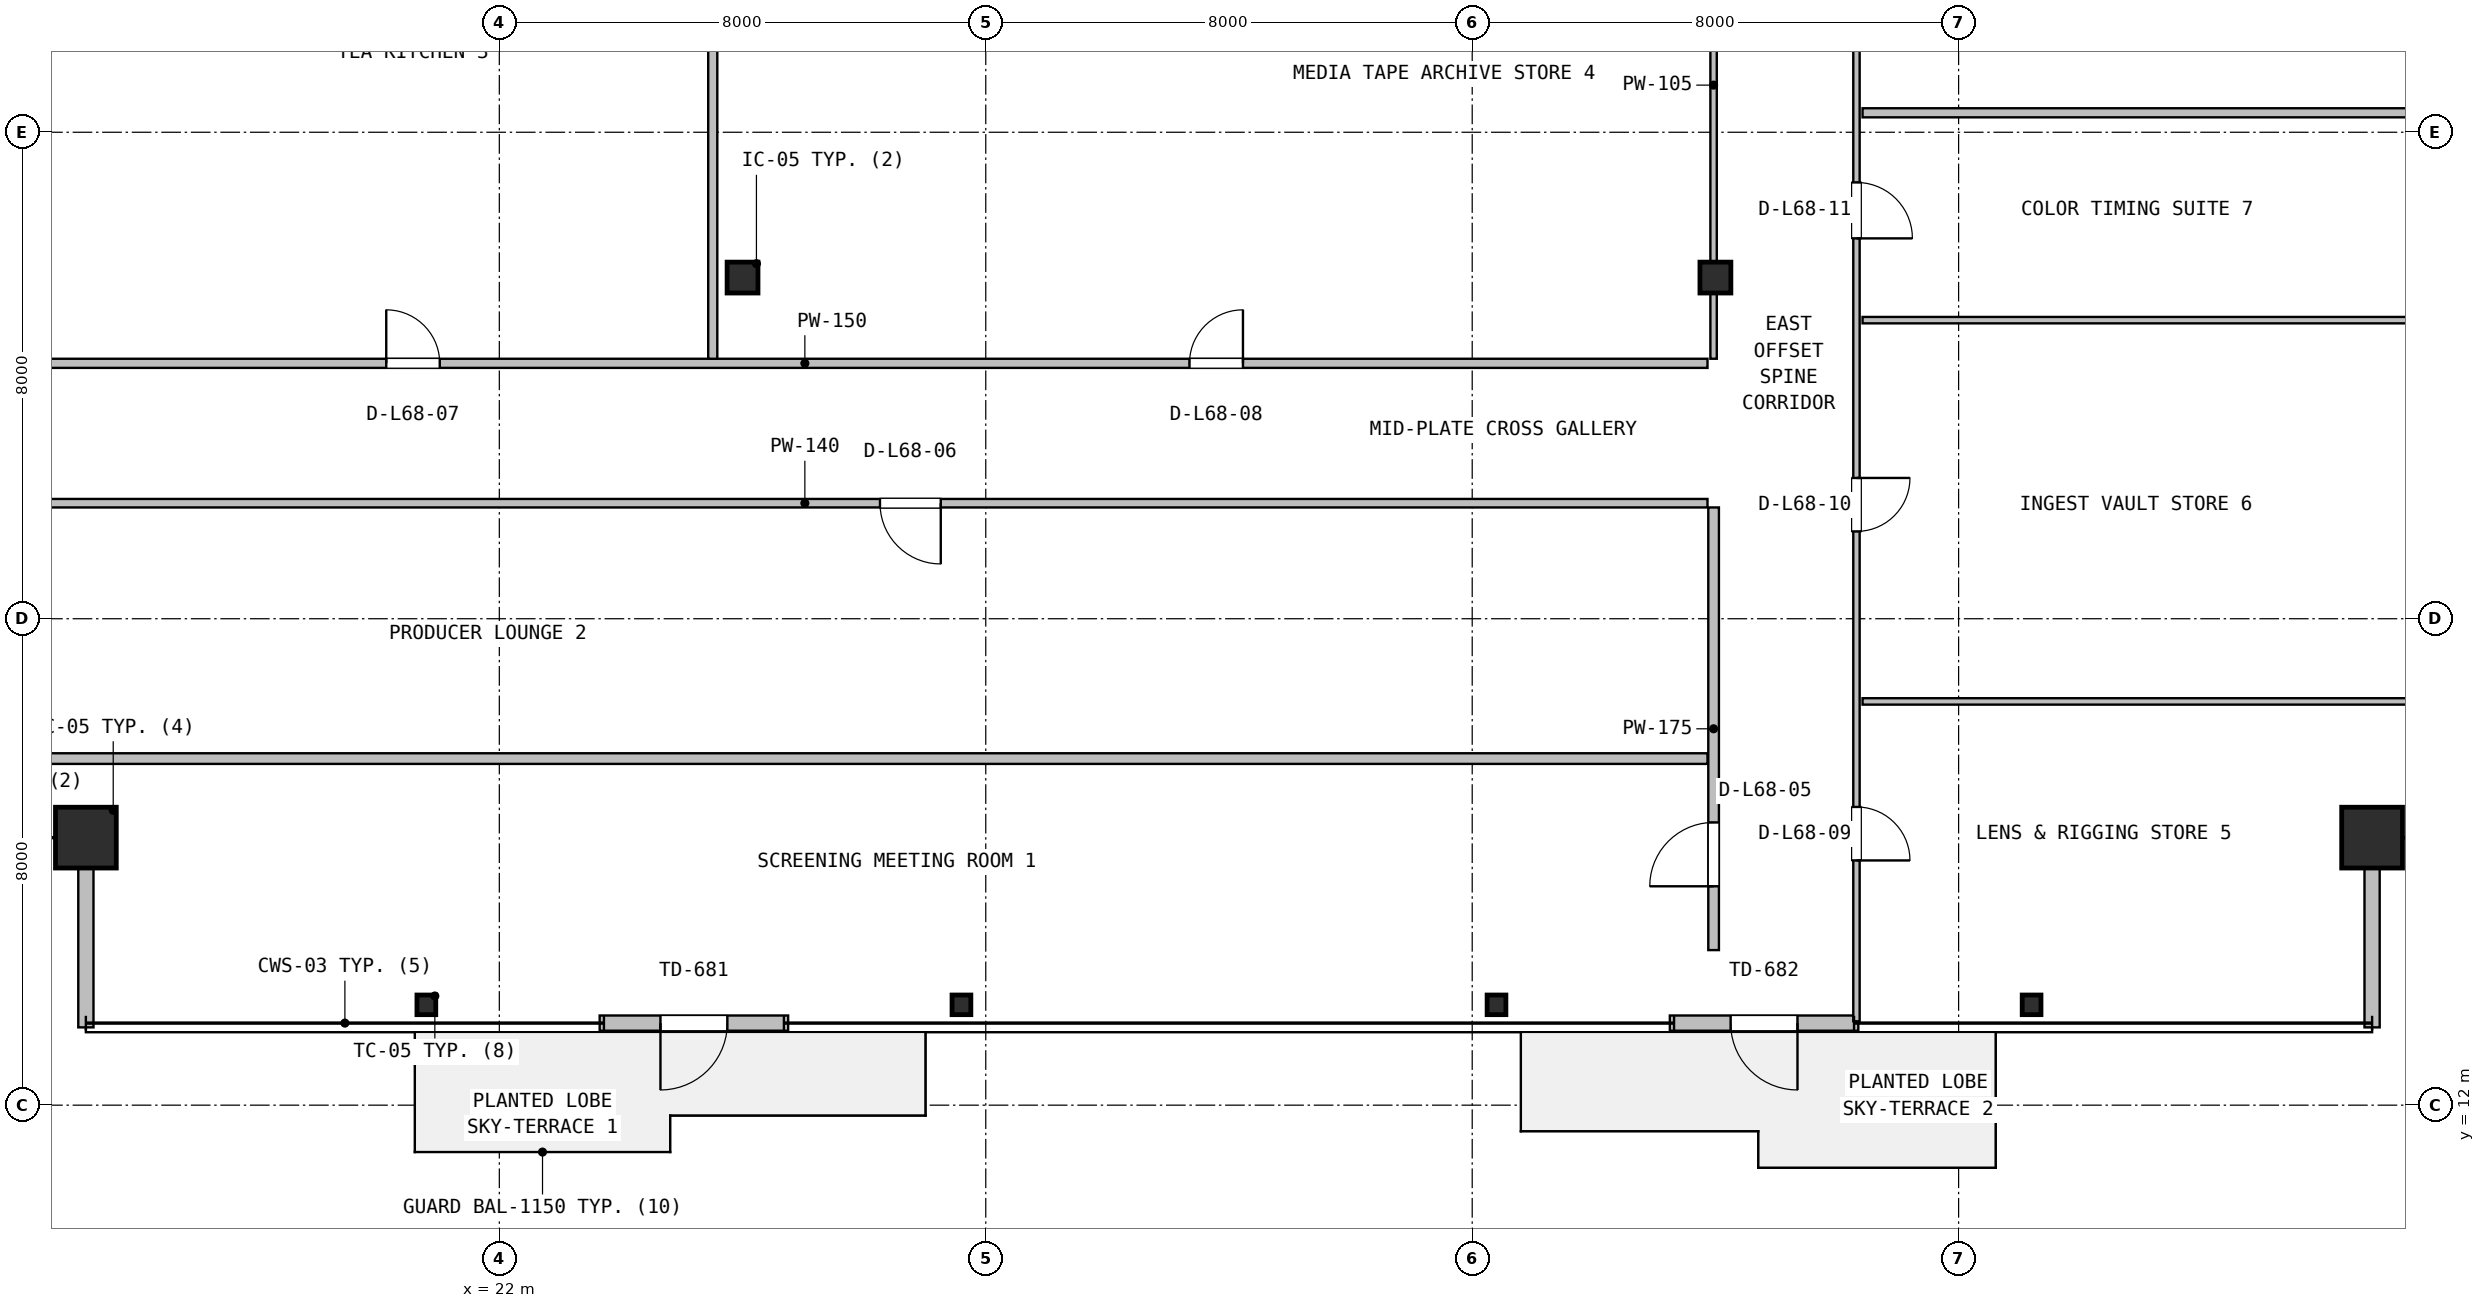
"""IFC4 building model, lengths in metres.
Left out: names, types, materials, properties, quantities, classifications, styles, units other than length and angle.
Written with IfcOpenShell. Run it as: python <this file> out.ifc"""

import sys

from ifc_helpers import new_model, si_unit, direction, frame, frame_2d, origin, origin_2d, place, context, subcontext, project, spatial, rectangle, hollow_rectangle, hollow_circle, i_section, extrude, source, transform, mapped, element, fill, save


model = new_model("IFC4")
c1 = context("Model", 3, precision=1e-05, world=origin(), true_north=direction((0.0, 1.0)))
c2 = subcontext(c1, "Body", "Model", "MODEL_VIEW")
j1 = project(units=[si_unit("LENGTHUNIT", "METRE"), si_unit("PLANEANGLEUNIT", "RADIAN")], contexts=[c1])
p1 = place(None, origin())
s1 = spatial("IfcSite", under=j1, at=p1, CompositionType="ELEMENT")
p2 = place(p1, origin())
s2 = spatial("IfcBuilding", under=s1, at=p2, CompositionType="ELEMENT")
p3 = place(p2, frame((0.0, 0.0, 273.6)))
s3 = spatial("IfcBuildingStorey", under=s2, at=p3, CompositionType="ELEMENT", Elevation=273.6)
m1 = source(origin(), c2, "Body", "SweptSolid", [
    extrude(hollow_rectangle(XDim=1.0, YDim=1.0, WallThickness=0.04, at=origin_2d()), origin(), (0.0, 0.0, 1.0), 3.8),
])
for number, where, z_axis, x_axis in (
    (1, (15.2, 16.4, 0.0), (0.0, 0.0, 1.0), (1.0, 0.0, 0.0)),
    (2, (52.8, 16.4, 0.0), (0.0, 0.0, 1.0), (1.0, 0.0, 0.0)),
):
    element("IfcColumn", number, at=place(p3, frame(where, z_axis=z_axis, x_axis=x_axis)), inside=s3, PredefinedType="COLUMN", context=c2, shape_type="MappedRepresentation", body=[
        mapped(m1, transform((0.0, 0.0, 0.0), x_axis=(1.0, 0.0, 0.0), y_axis=(0.0, 1.0, 0.0), z_axis=(0.0, 0.0, 1.0), scale=1.0)),
    ])
m2 = source(origin(), c2, "Body", "SweptSolid", [
    extrude(i_section(OverallWidth=0.309, OverallDepth=0.323, WebThickness=0.014, FlangeThickness=0.023, FilletRadius=0.015, at=origin_2d()), origin(), (0.0, 0.0, 1.0), 3.8),
])
for number, where, z_axis, x_axis in (
    (3, (20.8, 13.65, 0.0), (0.0, 0.0, 1.0), (1.0, 0.0, 0.0)),
    (4, (29.6, 13.65, 0.0), (0.0, 0.0, 1.0), (1.0, 0.0, 0.0)),
    (5, (38.4, 13.65, 0.0), (0.0, 0.0, 1.0), (1.0, 0.0, 0.0)),
    (6, (47.2, 13.65, 0.0), (0.0, 0.0, 1.0), (1.0, 0.0, 0.0)),
):
    element("IfcColumn", number, at=place(p3, frame(where, z_axis=z_axis, x_axis=x_axis)), inside=s3, PredefinedType="COLUMN", context=c2, shape_type="MappedRepresentation", body=[
        mapped(m2, transform((0.0, 0.0, 0.0), x_axis=(1.0, 0.0, 0.0), y_axis=(0.0, 1.0, 0.0), z_axis=(0.0, 0.0, 1.0), scale=1.0)),
    ])
m3 = source(origin(), c2, "Body", "SweptSolid", [
    extrude(hollow_circle(Radius=0.254, WallThickness=0.02, at=origin_2d()), origin(), (0.0, 0.0, 1.0), 3.8),
])
for number, where, z_axis, x_axis in (
    (7, (26.0, 25.61, 0.0), (0.0, 0.0, 1.0), (1.0, 0.0, 0.0)),
    (8, (42.0, 25.61, 0.0), (0.0, 0.0, 1.0), (1.0, 0.0, 0.0)),
):
    element("IfcColumn", number, at=place(p3, frame(where, z_axis=z_axis, x_axis=x_axis)), inside=s3, PredefinedType="COLUMN", context=c2, shape_type="MappedRepresentation", body=[
        mapped(m3, transform((0.0, 0.0, 0.0), x_axis=(1.0, 0.0, 0.0), y_axis=(0.0, 1.0, 0.0), z_axis=(0.0, 0.0, 1.0), scale=1.0)),
    ])
p4 = place(p3, frame((23.65, 13.35, 0.0), z_axis=(0.0, 0.0, 1.0), x_axis=(1.0, 0.0, 0.0)))
e9 = element("IfcWall", 9, at=p4, inside=s3, PredefinedType="SOLIDWALL", context=c2, shape_type="SweptSolid", body=[
    extrude(rectangle(XDim=3.1, YDim=0.25, at=frame_2d((1.55, 0.0))), origin(), (0.0, 0.0, 1.0), 3.53),
])
p5 = place(p4, frame((1.0, 0.0, 0.0)))
e10 = element("IfcOpeningElement", 10, at=p5, cuts=e9, PredefinedType="OPENING", context=c2, shape_type="SweptSolid", body=[
    extrude(rectangle(XDim=1.1, YDim=2.15, at=frame_2d((0.55, 1.075))), frame((0.0, 0.135, 0.0), z_axis=(0.0, -1.0, 0.0), x_axis=(1.0, 0.0, 0.0)), (0.0, 0.0, 1.0), 0.27),
])
p6 = place(p3, frame((41.25, 13.35, 0.0), z_axis=(0.0, 0.0, 1.0), x_axis=(1.0, 0.0, 0.0)))
e11 = element("IfcWall", 11, at=p6, inside=s3, PredefinedType="SOLIDWALL", context=c2, shape_type="SweptSolid", body=[
    extrude(rectangle(XDim=3.1, YDim=0.25, at=frame_2d((1.55, 0.0))), origin(), (0.0, 0.0, 1.0), 3.53),
])
p7 = place(p6, frame((1.0, 0.0, 0.0)))
e12 = element("IfcOpeningElement", 12, at=p7, cuts=e11, PredefinedType="OPENING", context=c2, shape_type="SweptSolid", body=[
    extrude(rectangle(XDim=1.1, YDim=2.15, at=frame_2d((0.55, 1.075))), frame((0.0, 0.135, 0.0), z_axis=(0.0, -1.0, 0.0), x_axis=(1.0, 0.0, 0.0)), (0.0, 0.0, 1.0), 0.27),
])
for number, where, z_axis, x_axis in (
    (13, (15.2, 13.28, 0.0), (0.0, 0.0, 1.0), (0.0, 1.0, 0.0)),
    (14, (52.8, 13.28, 0.0), (0.0, 0.0, 1.0), (0.0, 1.0, 0.0)),
):
    element("IfcWall", number, at=place(p3, frame(where, z_axis=z_axis, x_axis=x_axis)), inside=s3, PredefinedType="SOLIDWALL", context=c2, shape_type="SweptSolid", body=[
        extrude(rectangle(XDim=3.2, YDim=0.25, at=frame_2d((1.6, 0.0))), origin(), (0.0, 0.0, 1.0), 3.171),
    ])
p8 = place(p3, frame((41.97, 14.55, 0.0), z_axis=(0.0, 0.0, 1.0), x_axis=(0.0, 1.0, 0.0)))
e15 = element("IfcWall", 15, at=p8, inside=s3, PredefinedType="PARTITIONING", context=c2, shape_type="SweptSolid", body=[
    extrude(rectangle(XDim=7.28, YDim=0.175, at=frame_2d((3.64, 0.0))), origin(), (0.0, 0.0, 1.0), 2.981),
])
p9 = place(p8, frame((1.05, 0.0, 0.0)))
e16 = element("IfcOpeningElement", 16, at=p9, cuts=e15, PredefinedType="OPENING", context=c2, shape_type="SweptSolid", body=[
    extrude(rectangle(XDim=1.05, YDim=2.1, at=frame_2d((0.525, 1.05))), frame((0.0, 0.098, 0.0), z_axis=(0.0, -1.0, 0.0), x_axis=(1.0, 0.0, 0.0)), (0.0, 0.0, 1.0), 0.195),
])
p10 = place(p3, frame((12.18, 17.7, 0.0), z_axis=(0.0, 0.0, 1.0), x_axis=(1.0, 0.0, 0.0)))
e17 = element("IfcWall", 17, at=p10, inside=s3, PredefinedType="PARTITIONING", context=c2, shape_type="SweptSolid", body=[
    extrude(rectangle(XDim=29.69, YDim=0.175, at=frame_2d((14.845, 0.0))), origin(), (0.0, 0.0, 1.0), 2.981),
])
p11 = place(p3, frame((12.18, 21.9, 0.0), z_axis=(0.0, 0.0, 1.0), x_axis=(1.0, 0.0, 0.0)))
e18 = element("IfcWall", 18, at=p11, inside=s3, PredefinedType="PARTITIONING", context=c2, shape_type="SweptSolid", body=[
    extrude(rectangle(XDim=29.69, YDim=0.14, at=frame_2d((14.845, 0.0))), origin(), (0.0, 0.0, 1.0), 2.981),
])
p12 = place(p11, frame((16.08, 0.0, 0.0)))
e19 = element("IfcOpeningElement", 19, at=p12, cuts=e18, PredefinedType="OPENING", context=c2, shape_type="SweptSolid", body=[
    extrude(rectangle(XDim=1.0, YDim=2.1, at=frame_2d((0.5, 1.05))), frame((0.0, 0.08, 0.0), z_axis=(0.0, -1.0, 0.0), x_axis=(1.0, 0.0, 0.0)), (0.0, 0.0, 1.0), 0.16),
])
p13 = place(p3, frame((12.18, 24.2, 0.0), z_axis=(0.0, 0.0, 1.0), x_axis=(1.0, 0.0, 0.0)))
e20 = element("IfcWall", 20, at=p13, inside=s3, PredefinedType="PARTITIONING", context=c2, shape_type="SweptSolid", body=[
    extrude(rectangle(XDim=29.69, YDim=0.15, at=frame_2d((14.845, 0.0))), origin(), (0.0, 0.0, 1.0), 2.981),
])
p14 = place(p13, frame((7.96, 0.0, 0.0)))
e21 = element("IfcOpeningElement", 21, at=p14, cuts=e20, PredefinedType="OPENING", context=c2, shape_type="SweptSolid", body=[
    extrude(rectangle(XDim=0.88, YDim=2.06, at=frame_2d((0.44, 1.03))), frame((0.0, 0.085, 0.0), z_axis=(0.0, -1.0, 0.0), x_axis=(1.0, 0.0, 0.0)), (0.0, 0.0, 1.0), 0.17),
])
p15 = place(p13, frame((21.17, 0.0, 0.0)))
e22 = element("IfcOpeningElement", 22, at=p15, cuts=e20, PredefinedType="OPENING", context=c2, shape_type="SweptSolid", body=[
    extrude(rectangle(XDim=0.88, YDim=2.06, at=frame_2d((0.44, 1.03))), frame((0.0, 0.085, 0.0), z_axis=(0.0, -1.0, 0.0), x_axis=(1.0, 0.0, 0.0)), (0.0, 0.0, 1.0), 0.17),
])
p16 = place(p3, frame((25.51, 24.275, 0.0), z_axis=(0.0, 0.0, 1.0), x_axis=(0.0, 1.0, 0.0)))
e23 = element("IfcWall", 23, at=p16, inside=s3, PredefinedType="PARTITIONING", context=c2, shape_type="SweptSolid", body=[
    extrude(rectangle(XDim=9.0, YDim=0.15, at=frame_2d((4.5, 0.0))), origin(), (0.0, 0.0, 1.0), 2.981),
])
p17 = place(p3, frame((41.97, 24.275, 0.0), z_axis=(0.0, 0.0, 1.0), x_axis=(0.0, 1.0, 0.0)))
e24 = element("IfcWall", 24, at=p17, inside=s3, PredefinedType="PARTITIONING", context=c2, shape_type="SweptSolid", body=[
    extrude(rectangle(XDim=9.0, YDim=0.105, at=frame_2d((4.5, 0.0))), origin(), (0.0, 0.0, 1.0), 2.981),
])
p18 = place(p3, frame((44.42, 18.64, 0.0), z_axis=(0.0, 0.0, 1.0), x_axis=(1.0, 0.0, 0.0)))
e25 = element("IfcWall", 25, at=p18, inside=s3, PredefinedType="PARTITIONING", context=c2, shape_type="SweptSolid", body=[
    extrude(rectangle(XDim=11.4, YDim=0.105, at=frame_2d((5.7, 0.0))), origin(), (0.0, 0.0, 1.0), 3.171),
])
p19 = place(p3, frame((44.32, 13.38, 0.0), z_axis=(0.0, 0.0, 1.0), x_axis=(0.0, 1.0, 0.0)))
e26 = element("IfcWall", 26, at=p19, inside=s3, PredefinedType="PARTITIONING", context=c2, shape_type="SweptSolid", body=[
    extrude(rectangle(XDim=19.883, YDim=0.105, at=frame_2d((9.941, 0.0))), origin(), (0.0, 0.0, 1.0), 3.171),
])
p20 = place(p19, frame((2.645, 0.0, 0.0)))
e27 = element("IfcOpeningElement", 27, at=p20, cuts=e26, PredefinedType="OPENING", context=c2, shape_type="SweptSolid", body=[
    extrude(rectangle(XDim=0.88, YDim=2.06, at=frame_2d((0.44, 1.03))), frame((0.0, 0.062, 0.0), z_axis=(0.0, -1.0, 0.0), x_axis=(1.0, 0.0, 0.0)), (0.0, 0.0, 1.0), 0.125),
])
p21 = place(p19, frame((8.055, 0.0, 0.0)))
e28 = element("IfcOpeningElement", 28, at=p21, cuts=e26, PredefinedType="OPENING", context=c2, shape_type="SweptSolid", body=[
    extrude(rectangle(XDim=0.88, YDim=2.06, at=frame_2d((0.44, 1.03))), frame((0.0, 0.062, 0.0), z_axis=(0.0, -1.0, 0.0), x_axis=(1.0, 0.0, 0.0)), (0.0, 0.0, 1.0), 0.125),
])
p22 = place(p19, frame((12.875, 0.0, 0.0)))
e29 = element("IfcOpeningElement", 29, at=p22, cuts=e26, PredefinedType="OPENING", context=c2, shape_type="SweptSolid", body=[
    extrude(rectangle(XDim=0.92, YDim=2.08, at=frame_2d((0.46, 1.04))), frame((0.0, 0.062, 0.0), z_axis=(0.0, -1.0, 0.0), x_axis=(1.0, 0.0, 0.0)), (0.0, 0.0, 1.0), 0.125),
])
p23 = place(p3, frame((44.42, 24.91, 0.0), z_axis=(0.0, 0.0, 1.0), x_axis=(1.0, 0.0, 0.0)))
e30 = element("IfcWall", 30, at=p23, inside=s3, PredefinedType="PARTITIONING", context=c2, shape_type="SweptSolid", body=[
    extrude(rectangle(XDim=11.4, YDim=0.105, at=frame_2d((5.7, 0.0))), origin(), (0.0, 0.0, 1.0), 3.171),
])
p24 = place(p3, frame((44.42, 28.32, 0.0), z_axis=(0.0, 0.0, 1.0), x_axis=(1.0, 0.0, 0.0)))
e31 = element("IfcWall", 31, at=p24, inside=s3, PredefinedType="PARTITIONING", context=c2, shape_type="SweptSolid", body=[
    extrude(rectangle(XDim=11.4, YDim=0.15, at=frame_2d((5.7, 0.0))), origin(), (0.0, 0.0, 1.0), 3.171),
])
m4 = source(origin(), c2, "Body", "SweptSolid", [
    extrude(rectangle(XDim=1.1, YDim=2.15, at=frame_2d((0.55, 1.075))), frame((0.0, 0.025, 0.0), z_axis=(0.0, -1.0, 0.0), x_axis=(1.0, 0.0, 0.0)), (0.0, 0.0, 1.0), 0.05),
])
p25 = place(p5, frame((1.1, 0.0, 0.0), z_axis=(0.0, 0.0, 1.0), x_axis=(-1.0, 0.0, 0.0)))
e32 = element("IfcDoor", 32, at=p25, inside=s3, OperationType="SINGLE_SWING_LEFT", PredefinedType="DOOR", context=c2, shape_type="MappedRepresentation", body=[
    mapped(m4, transform((0.0, 0.0, 0.0), x_axis=(1.0, 0.0, 0.0), y_axis=(0.0, 1.0, 0.0), z_axis=(0.0, 0.0, 1.0), scale=1.0)),
])
fill(e10, e32)
p26 = place(p7, frame((1.1, 0.0, 0.0), z_axis=(0.0, 0.0, 1.0), x_axis=(-1.0, 0.0, 0.0)))
e33 = element("IfcDoor", 33, at=p26, inside=s3, OperationType="SINGLE_SWING_RIGHT", PredefinedType="DOOR", context=c2, shape_type="MappedRepresentation", body=[
    mapped(m4, transform((0.0, 0.0, 0.0), x_axis=(1.0, 0.0, 0.0), y_axis=(0.0, 1.0, 0.0), z_axis=(0.0, 0.0, 1.0), scale=1.0)),
])
fill(e12, e33)
m5 = source(origin(), c2, "Body", "SweptSolid", [
    extrude(rectangle(XDim=1.05, YDim=2.1, at=frame_2d((0.525, 1.05))), frame((0.0, 0.025, 0.0), z_axis=(0.0, -1.0, 0.0), x_axis=(1.0, 0.0, 0.0)), (0.0, 0.0, 1.0), 0.05),
])
p27 = place(p9, origin())
e34 = element("IfcDoor", 34, at=p27, inside=s3, OperationType="SINGLE_SWING_LEFT", PredefinedType="DOOR", context=c2, shape_type="MappedRepresentation", body=[
    mapped(m5, transform((0.0, 0.0, 0.0), x_axis=(1.0, 0.0, 0.0), y_axis=(0.0, 1.0, 0.0), z_axis=(0.0, 0.0, 1.0), scale=1.0)),
])
fill(e16, e34)
m6 = source(origin(), c2, "Body", "SweptSolid", [
    extrude(rectangle(XDim=1.0, YDim=2.1, at=frame_2d((0.5, 1.05))), frame((0.0, 0.025, 0.0), z_axis=(0.0, -1.0, 0.0), x_axis=(1.0, 0.0, 0.0)), (0.0, 0.0, 1.0), 0.05),
])
p28 = place(p12, frame((1.0, 0.0, 0.0), z_axis=(0.0, 0.0, 1.0), x_axis=(-1.0, 0.0, 0.0)))
e35 = element("IfcDoor", 35, at=p28, inside=s3, OperationType="SINGLE_SWING_RIGHT", PredefinedType="DOOR", context=c2, shape_type="MappedRepresentation", body=[
    mapped(m6, transform((0.0, 0.0, 0.0), x_axis=(1.0, 0.0, 0.0), y_axis=(0.0, 1.0, 0.0), z_axis=(0.0, 0.0, 1.0), scale=1.0)),
])
fill(e19, e35)
m7 = source(origin(), c2, "Body", "SweptSolid", [
    extrude(rectangle(XDim=0.88, YDim=2.06, at=frame_2d((0.44, 1.03))), frame((0.0, 0.025, 0.0), z_axis=(0.0, -1.0, 0.0), x_axis=(1.0, 0.0, 0.0)), (0.0, 0.0, 1.0), 0.05),
])
p29 = place(p14, origin())
e36 = element("IfcDoor", 36, at=p29, inside=s3, OperationType="SINGLE_SWING_LEFT", PredefinedType="DOOR", context=c2, shape_type="MappedRepresentation", body=[
    mapped(m7, transform((0.0, 0.0, 0.0), x_axis=(1.0, 0.0, 0.0), y_axis=(0.0, 1.0, 0.0), z_axis=(0.0, 0.0, 1.0), scale=1.0)),
])
fill(e21, e36)
p30 = place(p15, origin())
e37 = element("IfcDoor", 37, at=p30, inside=s3, OperationType="SINGLE_SWING_RIGHT", PredefinedType="DOOR", context=c2, shape_type="MappedRepresentation", body=[
    mapped(m7, transform((0.0, 0.0, 0.0), x_axis=(1.0, 0.0, 0.0), y_axis=(0.0, 1.0, 0.0), z_axis=(0.0, 0.0, 1.0), scale=1.0)),
])
fill(e22, e37)
p31 = place(p20, frame((0.88, 0.0, 0.0), z_axis=(0.0, 0.0, 1.0), x_axis=(-1.0, 0.0, 0.0)))
e38 = element("IfcDoor", 38, at=p31, inside=s3, OperationType="SINGLE_SWING_LEFT", PredefinedType="DOOR", context=c2, shape_type="MappedRepresentation", body=[
    mapped(m7, transform((0.0, 0.0, 0.0), x_axis=(1.0, 0.0, 0.0), y_axis=(0.0, 1.0, 0.0), z_axis=(0.0, 0.0, 1.0), scale=1.0)),
])
fill(e27, e38)
p32 = place(p21, frame((0.88, 0.0, 0.0), z_axis=(0.0, 0.0, 1.0), x_axis=(-1.0, 0.0, 0.0)))
e39 = element("IfcDoor", 39, at=p32, inside=s3, OperationType="SINGLE_SWING_RIGHT", PredefinedType="DOOR", context=c2, shape_type="MappedRepresentation", body=[
    mapped(m7, transform((0.0, 0.0, 0.0), x_axis=(1.0, 0.0, 0.0), y_axis=(0.0, 1.0, 0.0), z_axis=(0.0, 0.0, 1.0), scale=1.0)),
])
fill(e28, e39)
m8 = source(origin(), c2, "Body", "SweptSolid", [
    extrude(rectangle(XDim=0.92, YDim=2.08, at=frame_2d((0.46, 1.04))), frame((0.0, 0.025, 0.0), z_axis=(0.0, -1.0, 0.0), x_axis=(1.0, 0.0, 0.0)), (0.0, 0.0, 1.0), 0.05),
])
p33 = place(p22, frame((0.92, 0.0, 0.0), z_axis=(0.0, 0.0, 1.0), x_axis=(-1.0, 0.0, 0.0)))
e40 = element("IfcDoor", 40, at=p33, inside=s3, OperationType="SINGLE_SWING_LEFT", PredefinedType="DOOR", context=c2, shape_type="MappedRepresentation", body=[
    mapped(m8, transform((0.0, 0.0, 0.0), x_axis=(1.0, 0.0, 0.0), y_axis=(0.0, 1.0, 0.0), z_axis=(0.0, 0.0, 1.0), scale=1.0)),
])
fill(e29, e40)
save(model, sys.argv[1])
